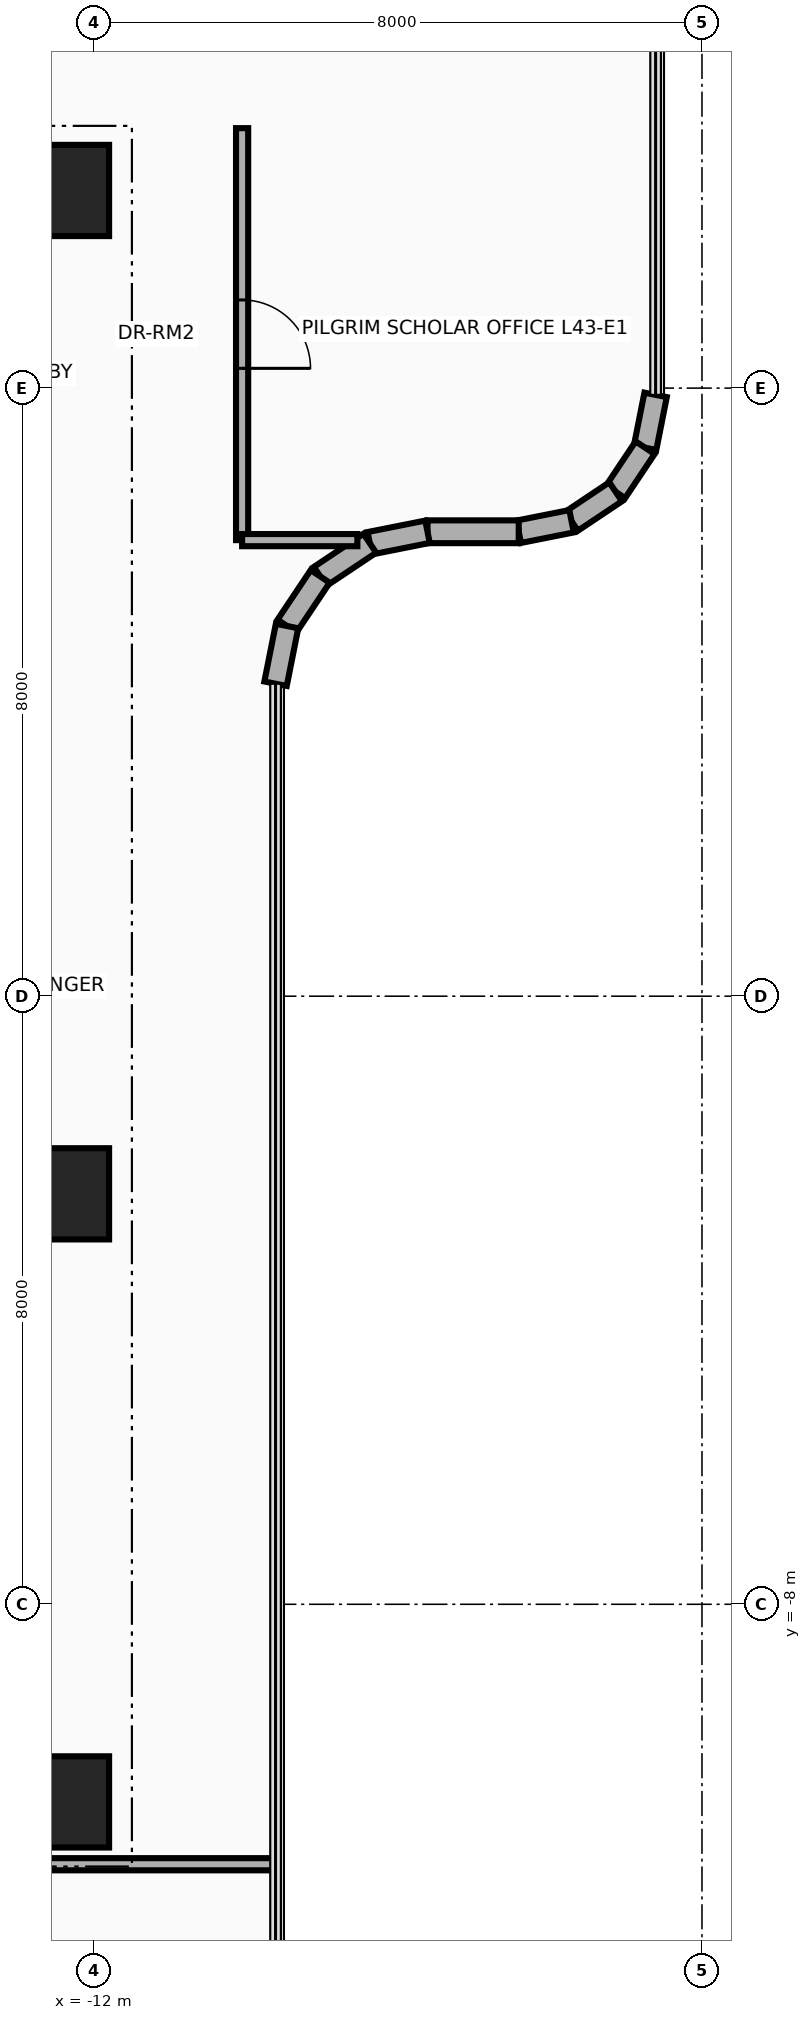
"""IFC4 building model, lengths in metres.
Left out: names, types, materials, properties, quantities, classifications, styles, units other than length and angle.
Written with IfcOpenShell. Run it as: python <this file> out.ifc"""

import sys

from ifc_helpers import new_model, si_unit, direction, frame, frame_2d, origin, origin_2d, place, context, subcontext, project, spatial, rectangle, extrude, source, transform, mapped, element, fill, save


model = new_model("IFC4")
c1 = context("Model", 3, precision=1e-05, world=origin(), true_north=direction((0.0, 1.0)))
c2 = subcontext(c1, "Body", "Model", "MODEL_VIEW")
j1 = project(units=[si_unit("LENGTHUNIT", "METRE"), si_unit("PLANEANGLEUNIT", "RADIAN")], contexts=[c1])
p1 = place(None, origin())
s1 = spatial("IfcSite", under=j1, at=p1, CompositionType="ELEMENT")
p2 = place(p1, origin())
s2 = spatial("IfcBuilding", under=s1, at=p2, CompositionType="ELEMENT")
p3 = place(p2, frame((0.0, 0.0, 168.6)))
s3 = spatial("IfcBuildingStorey", under=s2, at=p3, CompositionType="ELEMENT", Elevation=168.6)
for number, where, z_axis, x_axis in (
    (1, (-22.65, 10.8, 0.0), (0.0, 0.0, 1.0), (1.0, 0.0, 0.0)),
    (2, (-22.65, -10.8, 0.0), (0.0, 0.0, 1.0), (1.0, 0.0, 0.0)),
):
    element("IfcWall", number, at=place(p3, frame(where, z_axis=z_axis, x_axis=x_axis)), inside=s3, PredefinedType="SHEAR", context=c2, shape_type="SweptSolid", body=[
        extrude(rectangle(XDim=10.25, YDim=0.55, at=frame_2d((5.125, 0.0))), origin(), (0.0, 0.0, 1.0), 3.3),
    ])
m1 = source(origin(), c2, "Body", "SweptSolid", [
    extrude(rectangle(XDim=1.2, YDim=1.2, at=origin_2d()), origin(), (0.0, 0.0, 1.0), 3.7),
])
for number, where, z_axis, x_axis in (
    (3, (-12.4, -10.6, 0.0), (0.0, 0.0, 1.0), (1.0, 0.0, 0.0)),
    (4, (-12.4, -2.6, 0.0), (0.0, 0.0, 1.0), (1.0, 0.0, 0.0)),
    (5, (-12.4, 10.6, 0.0), (0.0, 0.0, 1.0), (1.0, 0.0, 0.0)),
):
    element("IfcColumn", number, at=place(p3, frame(where, z_axis=z_axis, x_axis=x_axis)), inside=s3, PredefinedType="COLUMN", context=c2, shape_type="MappedRepresentation", body=[
        mapped(m1, transform((0.0, 0.0, 0.0), x_axis=(1.0, 0.0, 0.0), y_axis=(0.0, 1.0, 0.0), z_axis=(0.0, 0.0, 1.0), scale=1.0)),
    ])
p4 = place(p3, frame((-4.61, 7.911, 0.0), z_axis=(0.0, 0.0, 1.0), x_axis=(-0.194989739953, -0.980805282058, 0.0)))
e6 = element("IfcWall", 6, at=p4, inside=s3, PredefinedType="SOLIDWALL", context=c2, shape_type="SweptSolid", body=[
    extrude(rectangle(XDim=0.709, YDim=0.3, at=frame_2d((0.354, 0.0))), origin(), (0.0, 0.0, 1.0), 3.3),
])
for number, where, z_axis, x_axis in (
    (7, (-4.748, 7.216, 0.0), (0.0, 0.0, 1.0), (-0.555, -0.832, 0.0)),
    (8, (-5.136, 6.636, 0.0), (0.0, 0.0, 1.0), (-0.832, -0.555, 0.0)),
):
    element("IfcWall", number, at=place(p3, frame(where, z_axis=z_axis, x_axis=x_axis)), inside=s3, PredefinedType="SOLIDWALL", context=c2, shape_type="SweptSolid", body=[
        extrude(rectangle(XDim=0.698, YDim=0.3, at=frame_2d((0.349, 0.0))), origin(), (0.0, 0.0, 1.0), 3.3),
    ])
p5 = place(p3, frame((-5.716, 6.248, 0.0), z_axis=(0.0, 0.0, 1.0), x_axis=(-0.980805282058, -0.194989739953, 0.0)))
e9 = element("IfcWall", 9, at=p5, inside=s3, PredefinedType="SOLIDWALL", context=c2, shape_type="SweptSolid", body=[
    extrude(rectangle(XDim=0.709, YDim=0.3, at=frame_2d((0.354, 0.0))), origin(), (0.0, 0.0, 1.0), 3.3),
])
p6 = place(p3, frame((-6.411, 6.11, 0.0), z_axis=(0.0, 0.0, 1.0), x_axis=(-1.0, 0.0, 0.0)))
e10 = element("IfcWall", 10, at=p6, inside=s3, PredefinedType="SOLIDWALL", context=c2, shape_type="SweptSolid", body=[
    extrude(rectangle(XDim=1.2, YDim=0.3, at=frame_2d((0.6, 0.0))), origin(), (0.0, 0.0, 1.0), 3.3),
])
p7 = place(p3, frame((-7.611, 6.11, 0.0), z_axis=(0.0, 0.0, 1.0), x_axis=(-0.98076219082, -0.195206365311, 0.0)))
e11 = element("IfcWall", 11, at=p7, inside=s3, PredefinedType="SOLIDWALL", context=c2, shape_type="SweptSolid", body=[
    extrude(rectangle(XDim=0.774, YDim=0.3, at=frame_2d((0.387, 0.0))), origin(), (0.0, 0.0, 1.0), 3.3),
])
for number, where, z_axis, x_axis in (
    (12, (-8.37, 5.959, 0.0), (0.0, 0.0, 1.0), (-0.831, -0.556, 0.0)),
    (13, (-9.023, 5.523, 0.0), (0.0, 0.0, 1.0), (-0.556, -0.831, 0.0)),
):
    element("IfcWall", number, at=place(p3, frame(where, z_axis=z_axis, x_axis=x_axis)), inside=s3, PredefinedType="SOLIDWALL", context=c2, shape_type="SweptSolid", body=[
        extrude(rectangle(XDim=0.785, YDim=0.3, at=frame_2d((0.393, 0.0))), origin(), (0.0, 0.0, 1.0), 3.3),
    ])
p8 = place(p3, frame((-9.459, 4.87, 0.0), z_axis=(0.0, 0.0, 1.0), x_axis=(-0.195206365311, -0.98076219082, 0.0)))
e14 = element("IfcWall", 14, at=p8, inside=s3, PredefinedType="SOLIDWALL", context=c2, shape_type="SweptSolid", body=[
    extrude(rectangle(XDim=0.774, YDim=0.3, at=frame_2d((0.387, 0.0))), origin(), (0.0, 0.0, 1.0), 3.3),
])
p9 = place(p3, frame((-23.45, -11.42, 0.0), z_axis=(0.0, 0.0, 1.0), x_axis=(1.0, 0.0, 0.0)))
e15 = element("IfcWall", 15, at=p9, inside=s3, PredefinedType="PARTITIONING", context=c2, shape_type="SweptSolid", body=[
    extrude(rectangle(XDim=13.84, YDim=0.16, at=frame_2d((6.92, 0.0))), origin(), (0.0, 0.0, 1.0), 2.674),
])
p10 = place(p3, frame((-10.05, 6.0, 0.0), z_axis=(0.0, 0.0, 1.0), x_axis=(0.0, 1.0, 0.0)))
e16 = element("IfcWall", 16, at=p10, inside=s3, PredefinedType="PARTITIONING", context=c2, shape_type="SweptSolid", body=[
    extrude(rectangle(XDim=5.42, YDim=0.16, at=frame_2d((2.71, 0.0))), origin(), (0.0, 0.0, 1.0), 1.785),
])
p11 = place(p10, frame((2.26, 0.0, 0.0)))
e17 = element("IfcOpeningElement", 17, at=p11, cuts=e16, PredefinedType="OPENING", context=c2, shape_type="SweptSolid", body=[
    extrude(rectangle(XDim=0.9, YDim=2.04, at=frame_2d((0.45, 1.02))), frame((0.0, 0.095, 0.0), z_axis=(0.0, -1.0, 0.0), x_axis=(1.0, 0.0, 0.0)), (0.0, 0.0, 1.0), 0.19),
])
p12 = place(p3, frame((-10.05, 6.0, 0.0), z_axis=(0.0, 0.0, 1.0), x_axis=(1.0, 0.0, 0.0)))
e18 = element("IfcWall", 18, at=p12, inside=s3, PredefinedType="PARTITIONING", context=c2, shape_type="SweptSolid", body=[
    extrude(rectangle(XDim=1.516, YDim=0.16, at=frame_2d((0.758, 0.0))), origin(), (0.0, 0.0, 1.0), 3.3),
])
p13 = place(p11, frame((0.9, 0.0, 0.0), z_axis=(0.0, 0.0, 1.0), x_axis=(-1.0, 0.0, 0.0)))
e19 = element("IfcDoor", 19, at=p13, inside=s3, OperationType="SINGLE_SWING_LEFT", PredefinedType="DOOR", context=c2, shape_type="SweptSolid", body=[
    extrude(rectangle(XDim=0.9, YDim=2.04, at=frame_2d((0.45, 1.02))), frame((0.0, 0.025, 0.0), z_axis=(0.0, -1.0, 0.0), x_axis=(1.0, 0.0, 0.0)), (0.0, 0.0, 1.0), 0.05),
])
fill(e17, e19)
save(model, sys.argv[1])
